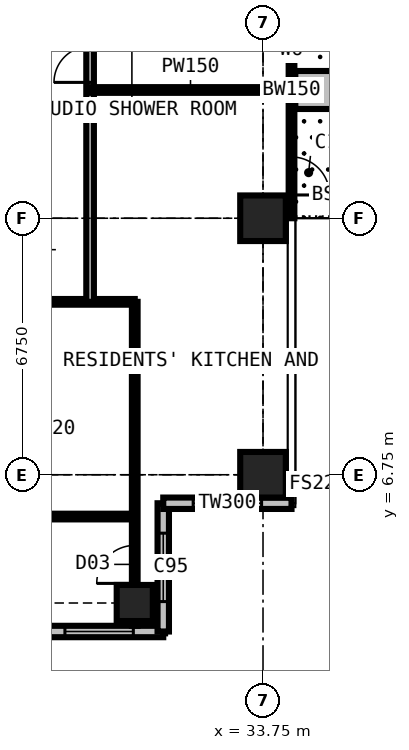
"""IFC4 building model, lengths in metres.
Left out: names, types, materials, properties, quantities, classifications, styles, units other than length and angle.
Written with IfcOpenShell. Run it as: python <this file> out.ifc"""

import sys

from ifc_helpers import new_model, si_unit, direction, frame, frame_2d, origin, origin_2d, place, context, subcontext, project, spatial, rectangle, extrude, element, fill, save


model = new_model("IFC4")
c1 = context("Model", 3, precision=1e-05, world=origin(), true_north=direction((0.0, 1.0)))
c2 = subcontext(c1, "Body", "Model", "MODEL_VIEW")
j1 = project(units=[si_unit("LENGTHUNIT", "METRE"), si_unit("PLANEANGLEUNIT", "RADIAN")], contexts=[c1])
p1 = place(None, origin())
s1 = spatial("IfcSite", under=j1, at=p1, CompositionType="ELEMENT")
p2 = place(p1, origin())
s2 = spatial("IfcBuilding", under=s1, at=p2, CompositionType="ELEMENT")
p3 = place(p2, frame((0.0, 0.0, 185.4)))
s3 = spatial("IfcBuildingStorey", under=s2, at=p3, CompositionType="ELEMENT", Elevation=185.4)
p4 = place(p3, frame((30.375, 3.375, 0.0), z_axis=(0.0, 0.0, 1.0), x_axis=(1.0, 0.0, 0.0)))
e1 = element("IfcColumn", 1, at=p4, inside=s3, PredefinedType="COLUMN", context=c2, shape_type="SweptSolid", body=[
    extrude(rectangle(XDim=0.95, YDim=0.95, at=origin_2d()), origin(), (0.0, 0.0, 1.0), 3.6),
])
for number, where, z_axis, x_axis in (
    (2, (33.75, 6.75, 0.0), (0.0, 0.0, 1.0), (1.0, 0.0, 0.0)),
    (3, (33.75, 13.5, 0.0), (0.0, 0.0, 1.0), (1.0, 0.0, 0.0)),
):
    element("IfcColumn", number, at=place(p3, frame(where, z_axis=z_axis, x_axis=x_axis)), inside=s3, PredefinedType="COLUMN", context=c2, shape_type="SweptSolid", body=[
        extrude(rectangle(XDim=1.2, YDim=1.2, at=origin_2d()), origin(), (0.0, 0.0, 1.0), 3.6),
    ])
p5 = place(p3, frame((34.5, 20.25, 0.0), z_axis=(0.0, 0.0, 1.0), x_axis=(0.0, -1.0, 0.0)))
e4 = element("IfcWall", 4, at=p5, inside=s3, PredefinedType="SOLIDWALL", context=c2, shape_type="SweptSolid", body=[
    extrude(rectangle(XDim=6.75, YDim=0.15, at=frame_2d((3.375, 0.0))), origin(), (0.0, 0.0, 1.0), 3.375),
])
p6 = place(p5, frame((0.613, 0.0, 0.0)))
e5 = element("IfcOpeningElement", 5, at=p6, cuts=e4, PredefinedType="OPENING", context=c2, shape_type="SweptSolid", body=[
    extrude(rectangle(XDim=1.0, YDim=2.2, at=frame_2d((0.5, 1.1))), frame((0.0, 0.085, 0.0), z_axis=(0.0, -1.0, 0.0), x_axis=(1.0, 0.0, 0.0)), (0.0, 0.0, 1.0), 0.17),
])
p7 = place(p5, frame((1.725, 0.0, 0.9)))
e6 = element("IfcOpeningElement", 6, at=p7, cuts=e4, PredefinedType="OPENING", context=c2, shape_type="SweptSolid", body=[
    extrude(rectangle(XDim=1.2, YDim=1.8, at=frame_2d((0.6, 0.9))), frame((0.0, 0.085, 0.0), z_axis=(0.0, -1.0, 0.0), x_axis=(1.0, 0.0, 0.0)), (0.0, 0.0, 1.0), 0.17),
])
p8 = place(p5, frame((5.137, 0.0, 0.0)))
e7 = element("IfcOpeningElement", 7, at=p8, cuts=e4, PredefinedType="OPENING", context=c2, shape_type="SweptSolid", body=[
    extrude(rectangle(XDim=1.0, YDim=2.2, at=frame_2d((0.5, 1.1))), frame((0.0, 0.085, 0.0), z_axis=(0.0, -1.0, 0.0), x_axis=(1.0, 0.0, 0.0)), (0.0, 0.0, 1.0), 0.17),
])
p9 = place(p5, frame((3.825, 0.0, 0.9)))
e8 = element("IfcOpeningElement", 8, at=p9, cuts=e4, PredefinedType="OPENING", context=c2, shape_type="SweptSolid", body=[
    extrude(rectangle(XDim=1.2, YDim=1.8, at=frame_2d((0.6, 0.9))), frame((0.0, 0.085, 0.0), z_axis=(0.0, -1.0, 0.0), x_axis=(1.0, 0.0, 0.0)), (0.0, 0.0, 1.0), 0.17),
])
p10 = place(p3, frame((27.75, 2.625, 0.0), z_axis=(0.0, 0.0, 1.0), x_axis=(1.0, 0.0, 0.0)))
e9 = element("IfcWall", 9, at=p10, inside=s3, PredefinedType="SOLIDWALL", context=c2, shape_type="SweptSolid", body=[
    extrude(rectangle(XDim=3.375, YDim=0.3, at=frame_2d((1.688, 0.0))), origin(), (0.0, 0.0, 1.0), 3.375),
])
p11 = place(p10, frame((0.788, 0.0, 0.6)))
e10 = element("IfcOpeningElement", 10, at=p11, cuts=e9, PredefinedType="OPENING", context=c2, shape_type="SweptSolid", body=[
    extrude(rectangle(XDim=1.8, YDim=2.1, at=frame_2d((0.9, 1.05))), frame((0.0, 0.16, 0.0), z_axis=(0.0, -1.0, 0.0), x_axis=(1.0, 0.0, 0.0)), (0.0, 0.0, 1.0), 0.32),
])
p12 = place(p3, frame((31.125, 2.625, 0.0), z_axis=(0.0, 0.0, 1.0), x_axis=(0.0, 1.0, 0.0)))
e11 = element("IfcWall", 11, at=p12, inside=s3, PredefinedType="SOLIDWALL", context=c2, shape_type="SweptSolid", body=[
    extrude(rectangle(XDim=3.375, YDim=0.3, at=frame_2d((1.688, 0.0))), origin(), (0.0, 0.0, 1.0), 3.375),
])
p13 = place(p12, frame((0.788, 0.0, 0.6)))
e12 = element("IfcOpeningElement", 12, at=p13, cuts=e11, PredefinedType="OPENING", context=c2, shape_type="SweptSolid", body=[
    extrude(rectangle(XDim=1.8, YDim=2.1, at=frame_2d((0.9, 1.05))), frame((0.0, 0.16, 0.0), z_axis=(0.0, -1.0, 0.0), x_axis=(1.0, 0.0, 0.0)), (0.0, 0.0, 1.0), 0.32),
])
p14 = place(p3, frame((31.125, 6.0, 0.0), z_axis=(0.0, 0.0, 1.0), x_axis=(1.0, 0.0, 0.0)))
e13 = element("IfcWall", 13, at=p14, inside=s3, PredefinedType="SOLIDWALL", context=c2, shape_type="SweptSolid", body=[
    extrude(rectangle(XDim=3.375, YDim=0.3, at=frame_2d((1.688, 0.0))), origin(), (0.0, 0.0, 1.0), 3.375),
])
p15 = place(p14, frame((0.788, 0.0, 0.6)))
e14 = element("IfcOpeningElement", 14, at=p15, cuts=e13, PredefinedType="OPENING", context=c2, shape_type="SweptSolid", body=[
    extrude(rectangle(XDim=1.8, YDim=2.1, at=frame_2d((0.9, 1.05))), frame((0.0, 0.16, 0.0), z_axis=(0.0, -1.0, 0.0), x_axis=(1.0, 0.0, 0.0)), (0.0, 0.0, 1.0), 0.32),
])
p16 = place(p3, frame((34.6, 16.875, 0.0), z_axis=(0.0, 0.0, 1.0), x_axis=(1.0, 0.0, 0.0)))
e15 = element("IfcWall", 15, at=p16, inside=s3, PredefinedType="USERDEFINED", context=c2, shape_type="SweptSolid", body=[
    extrude(rectangle(XDim=2.2, YDim=1.0, at=frame_2d((1.1, 0.0))), origin(), (0.0, 0.0, 1.0), 0.9),
])
p17 = place(p3, frame((10.125, 11.3, 0.0), z_axis=(0.0, 0.0, 1.0), x_axis=(1.0, 0.0, 0.0)))
e16 = element("IfcWall", 16, at=p17, inside=s3, PredefinedType="PARTITIONING", context=c2, shape_type="SweptSolid", body=[
    extrude(rectangle(XDim=20.25, YDim=0.15, at=frame_2d((10.125, 0.0))), origin(), (0.0, 0.0, 1.0), 3.375),
])
p18 = place(p17, frame((5.2, 0.0, 0.0)))
e17 = element("IfcOpeningElement", 17, at=p18, cuts=e16, PredefinedType="OPENING", context=c2, shape_type="SweptSolid", body=[
    extrude(rectangle(XDim=1.0, YDim=2.2, at=frame_2d((0.5, 1.1))), frame((0.0, 0.085, 0.0), z_axis=(0.0, -1.0, 0.0), x_axis=(1.0, 0.0, 0.0)), (0.0, 0.0, 1.0), 0.17),
])
p19 = place(p17, frame((11.312, 0.0, 0.0)))
e18 = element("IfcOpeningElement", 18, at=p19, cuts=e16, PredefinedType="OPENING", context=c2, shape_type="SweptSolid", body=[
    extrude(rectangle(XDim=1.0, YDim=2.2, at=frame_2d((0.5, 1.1))), frame((0.0, 0.085, 0.0), z_axis=(0.0, -1.0, 0.0), x_axis=(1.0, 0.0, 0.0)), (0.0, 0.0, 1.0), 0.17),
])
p20 = place(p17, frame((3.325, 0.0, 0.0)))
e19 = element("IfcOpeningElement", 19, at=p20, cuts=e16, PredefinedType="OPENING", context=c2, shape_type="SweptSolid", body=[
    extrude(rectangle(XDim=0.95, YDim=2.2, at=frame_2d((0.475, 1.1))), frame((0.0, 0.085, 0.0), z_axis=(0.0, -1.0, 0.0), x_axis=(1.0, 0.0, 0.0)), (0.0, 0.0, 1.0), 0.17),
])
p21 = place(p3, frame((22.988, 5.65, 0.0), z_axis=(0.0, 0.0, 1.0), x_axis=(1.0, 0.0, 0.0)))
e20 = element("IfcWall", 20, at=p21, inside=s3, PredefinedType="PARTITIONING", context=c2, shape_type="SweptSolid", body=[
    extrude(rectangle(XDim=7.387, YDim=0.15, at=frame_2d((3.694, 0.0))), origin(), (0.0, 0.0, 1.0), 3.375),
])
p22 = place(p21, frame((2.45, 0.0, 0.0)))
e21 = element("IfcOpeningElement", 21, at=p22, cuts=e20, PredefinedType="OPENING", context=c2, shape_type="SweptSolid", body=[
    extrude(rectangle(XDim=0.95, YDim=2.2, at=frame_2d((0.475, 1.1))), frame((0.0, 0.085, 0.0), z_axis=(0.0, -1.0, 0.0), x_axis=(1.0, 0.0, 0.0)), (0.0, 0.0, 1.0), 0.17),
])
p23 = place(p3, frame((29.2, 11.3, 0.0), z_axis=(0.0, 0.0, 1.0), x_axis=(0.0, 1.0, 0.0)))
e22 = element("IfcWall", 22, at=p23, inside=s3, PredefinedType="PARTITIONING", context=c2, shape_type="SweptSolid", body=[
    extrude(rectangle(XDim=17.9, YDim=0.2, at=frame_2d((8.95, 0.0))), origin(), (0.0, 0.0, 1.0), 3.375),
])
p24 = place(p23, frame((10.55, 0.0, 0.0)))
e23 = element("IfcOpeningElement", 23, at=p24, cuts=e22, PredefinedType="OPENING", context=c2, shape_type="SweptSolid", body=[
    extrude(rectangle(XDim=0.95, YDim=2.2, at=frame_2d((0.475, 1.1))), frame((0.0, 0.11, 0.0), z_axis=(0.0, -1.0, 0.0), x_axis=(1.0, 0.0, 0.0)), (0.0, 0.0, 1.0), 0.22),
])
p25 = place(p23, frame((5.775, 0.0, 0.0)))
e24 = element("IfcOpeningElement", 24, at=p25, cuts=e22, PredefinedType="OPENING", context=c2, shape_type="SweptSolid", body=[
    extrude(rectangle(XDim=0.95, YDim=2.2, at=frame_2d((0.475, 1.1))), frame((0.0, 0.11, 0.0), z_axis=(0.0, -1.0, 0.0), x_axis=(1.0, 0.0, 0.0)), (0.0, 0.0, 1.0), 0.22),
])
p26 = place(p23, frame((16.3, 0.0, 0.0)))
e25 = element("IfcOpeningElement", 25, at=p26, cuts=e22, PredefinedType="OPENING", context=c2, shape_type="SweptSolid", body=[
    extrude(rectangle(XDim=1.0, YDim=2.2, at=frame_2d((0.5, 1.1))), frame((0.0, 0.11, 0.0), z_axis=(0.0, -1.0, 0.0), x_axis=(1.0, 0.0, 0.0)), (0.0, 0.0, 1.0), 0.22),
])
p27 = place(p3, frame((29.2, 16.875, 0.0), z_axis=(0.0, 0.0, 1.0), x_axis=(1.0, 0.0, 0.0)))
e26 = element("IfcWall", 26, at=p27, inside=s3, PredefinedType="PARTITIONING", context=c2, shape_type="SweptSolid", body=[
    extrude(rectangle(XDim=5.284, YDim=0.15, at=frame_2d((2.642, 0.0))), origin(), (0.0, 0.0, 1.0), 3.375),
])
p28 = place(p3, frame((30.375, 2.775, 0.0), z_axis=(0.0, 0.0, 1.0), x_axis=(0.0, 1.0, 0.0)))
e27 = element("IfcWall", 27, at=p28, inside=s3, PredefinedType="PARTITIONING", context=c2, shape_type="SweptSolid", body=[
    extrude(rectangle(XDim=8.525, YDim=0.15, at=frame_2d((4.263, 0.0))), origin(), (0.0, 0.0, 1.0), 2.877),
])
p29 = place(p28, frame((1.116, 0.0, 0.0)))
e28 = element("IfcOpeningElement", 28, at=p29, cuts=e27, PredefinedType="OPENING", context=c2, shape_type="SweptSolid", body=[
    extrude(rectangle(XDim=1.0, YDim=2.2, at=frame_2d((0.5, 1.1))), frame((0.0, 0.085, 0.0), z_axis=(0.0, -1.0, 0.0), x_axis=(1.0, 0.0, 0.0)), (0.0, 0.0, 1.0), 0.17),
])
p30 = place(p7, origin())
e29 = element("IfcWindow", 29, at=p30, inside=s3, PartitioningType="SINGLE_PANEL", PredefinedType="WINDOW", context=c2, shape_type="SweptSolid", body=[
    extrude(rectangle(XDim=1.2, YDim=1.8, at=frame_2d((0.6, 0.9))), frame((0.0, 0.03, 0.0), z_axis=(0.0, -1.0, 0.0), x_axis=(1.0, 0.0, 0.0)), (0.0, 0.0, 1.0), 0.06),
])
fill(e6, e29)
p31 = place(p8, origin())
e30 = element("IfcDoor", 30, at=p31, inside=s3, OperationType="SINGLE_SWING_RIGHT", PredefinedType="DOOR", context=c2, shape_type="SweptSolid", body=[
    extrude(rectangle(XDim=1.0, YDim=2.2, at=frame_2d((0.5, 1.1))), frame((0.0, 0.025, 0.0), z_axis=(0.0, -1.0, 0.0), x_axis=(1.0, 0.0, 0.0)), (0.0, 0.0, 1.0), 0.05),
])
fill(e7, e30)
p32 = place(p9, origin())
e31 = element("IfcWindow", 31, at=p32, inside=s3, PartitioningType="SINGLE_PANEL", PredefinedType="WINDOW", context=c2, shape_type="SweptSolid", body=[
    extrude(rectangle(XDim=1.2, YDim=1.8, at=frame_2d((0.6, 0.9))), frame((0.0, 0.03, 0.0), z_axis=(0.0, -1.0, 0.0), x_axis=(1.0, 0.0, 0.0)), (0.0, 0.0, 1.0), 0.06),
])
fill(e8, e31)
p33 = place(p11, origin())
e32 = element("IfcWindow", 32, at=p33, inside=s3, PartitioningType="SINGLE_PANEL", PredefinedType="WINDOW", context=c2, shape_type="SweptSolid", body=[
    extrude(rectangle(XDim=1.8, YDim=2.1, at=frame_2d((0.9, 1.05))), frame((0.0, 0.03, 0.0), z_axis=(0.0, -1.0, 0.0), x_axis=(1.0, 0.0, 0.0)), (0.0, 0.0, 1.0), 0.06),
])
fill(e10, e32)
p34 = place(p13, origin())
e33 = element("IfcWindow", 33, at=p34, inside=s3, PartitioningType="SINGLE_PANEL", PredefinedType="WINDOW", context=c2, shape_type="SweptSolid", body=[
    extrude(rectangle(XDim=1.8, YDim=2.1, at=frame_2d((0.9, 1.05))), frame((0.0, 0.03, 0.0), z_axis=(0.0, -1.0, 0.0), x_axis=(1.0, 0.0, 0.0)), (0.0, 0.0, 1.0), 0.06),
])
fill(e12, e33)
p35 = place(p15, origin())
e34 = element("IfcWindow", 34, at=p35, inside=s3, PartitioningType="SINGLE_PANEL", PredefinedType="WINDOW", context=c2, shape_type="SweptSolid", body=[
    extrude(rectangle(XDim=1.8, YDim=2.1, at=frame_2d((0.9, 1.05))), frame((0.0, 0.03, 0.0), z_axis=(0.0, -1.0, 0.0), x_axis=(1.0, 0.0, 0.0)), (0.0, 0.0, 1.0), 0.06),
])
fill(e14, e34)
p36 = place(p29, origin())
e35 = element("IfcDoor", 35, at=p36, inside=s3, OperationType="SINGLE_SWING_LEFT", PredefinedType="DOOR", context=c2, shape_type="SweptSolid", body=[
    extrude(rectangle(XDim=1.0, YDim=2.2, at=frame_2d((0.5, 1.1))), frame((0.0, 0.025, 0.0), z_axis=(0.0, -1.0, 0.0), x_axis=(1.0, 0.0, 0.0)), (0.0, 0.0, 1.0), 0.05),
])
fill(e28, e35)
p37 = place(p25, origin())
e36 = element("IfcDoor", 36, at=p37, inside=s3, OperationType="SINGLE_SWING_LEFT", PredefinedType="DOOR", context=c2, shape_type="SweptSolid", body=[
    extrude(rectangle(XDim=0.95, YDim=2.2, at=frame_2d((0.475, 1.1))), frame((0.0, 0.025, 0.0), z_axis=(0.0, -1.0, 0.0), x_axis=(1.0, 0.0, 0.0)), (0.0, 0.0, 1.0), 0.05),
])
fill(e24, e36)
save(model, sys.argv[1])
